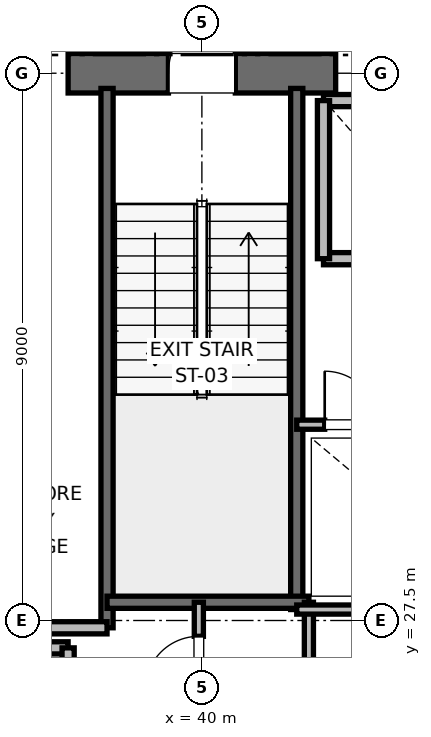
"""IFC4 building model, lengths in metres.
Left out: names, types, materials, properties, quantities, classifications, styles, units other than length and angle.
Written with IfcOpenShell. Run it as: python <this file> out.ifc"""

import sys

from ifc_helpers import new_model, si_unit, direction, frame, frame_2d, origin, place, context, subcontext, project, spatial, rectangle, extrude, element, fill, save


model = new_model("IFC4")
c1 = context("Model", 3, precision=1e-05, world=origin(), true_north=direction((0.0, 1.0)))
c2 = subcontext(c1, "Body", "Model", "MODEL_VIEW")
j1 = project(units=[si_unit("LENGTHUNIT", "METRE"), si_unit("PLANEANGLEUNIT", "RADIAN")], contexts=[c1])
p1 = place(None, origin())
s1 = spatial("IfcSite", under=j1, at=p1, CompositionType="ELEMENT")
p2 = place(p1, origin())
s2 = spatial("IfcBuilding", under=s1, at=p2, CompositionType="ELEMENT")
p3 = place(p2, frame((0.0, 0.0, 71.6)))
s3 = spatial("IfcBuildingStorey", under=s2, at=p3, CompositionType="ELEMENT", Elevation=71.6)
p4 = place(p3, frame((37.8, 36.5, 0.0), z_axis=(0.0, 0.0, 1.0), x_axis=(1.0, 0.0, 0.0)))
e1 = element("IfcWall", 1, at=p4, inside=s3, PredefinedType="SHEAR", context=c2, shape_type="SweptSolid", body=[
    extrude(rectangle(XDim=4.4, YDim=0.65, at=frame_2d((2.2, 0.0))), origin(), (0.0, 0.0, 1.0), 3.76),
])
p5 = place(p4, frame((1.65, 0.0, 0.0)))
e2 = element("IfcOpeningElement", 2, at=p5, cuts=e1, PredefinedType="OPENING", context=c2, shape_type="SweptSolid", body=[
    extrude(rectangle(XDim=1.1, YDim=2.15, at=frame_2d((0.55, 1.075))), frame((0.0, 0.325, 0.0), z_axis=(0.0, -1.0, 0.0), x_axis=(1.0, 0.0, 0.0)), (0.0, 0.0, 1.0), 0.65),
])
p6 = place(p3, frame((38.44, 27.38, 0.0), z_axis=(0.0, 0.0, 1.0), x_axis=(0.0, 1.0, 0.0)))
e3 = element("IfcWall", 3, at=p6, inside=s3, PredefinedType="SOLIDWALL", context=c2, shape_type="SweptSolid", body=[
    extrude(rectangle(XDim=8.87, YDim=0.2, at=frame_2d((4.435, 0.0))), origin(), (0.0, 0.0, 1.0), 3.76),
])
p7 = place(p3, frame((41.56, 27.68, 0.0), z_axis=(0.0, 0.0, 1.0), x_axis=(0.0, 1.0, 0.0)))
e4 = element("IfcWall", 4, at=p7, inside=s3, PredefinedType="SOLIDWALL", context=c2, shape_type="SweptSolid", body=[
    extrude(rectangle(XDim=8.57, YDim=0.2, at=frame_2d((4.285, 0.0))), origin(), (0.0, 0.0, 1.0), 3.76),
])
p8 = place(p3, frame((38.44, 27.8, 0.0), z_axis=(0.0, 0.0, 1.0), x_axis=(1.0, 0.0, 0.0)))
e5 = element("IfcWall", 5, at=p8, inside=s3, PredefinedType="SOLIDWALL", context=c2, shape_type="SweptSolid", body=[
    extrude(rectangle(XDim=3.32, YDim=0.2, at=frame_2d((1.66, 0.0))), origin(), (0.0, 0.0, 1.0), 3.76),
])
p9 = place(p3, frame((32.82, 27.38, 0.0), z_axis=(0.0, 0.0, 1.0), x_axis=(1.0, 0.0, 0.0)))
e6 = element("IfcWall", 6, at=p9, inside=s3, PredefinedType="PARTITIONING", context=c2, shape_type="SweptSolid", body=[
    extrude(rectangle(XDim=5.62, YDim=0.2, at=frame_2d((2.81, 0.0))), origin(), (0.0, 0.0, 1.0), 3.76),
])
p10 = place(p3, frame((37.8, 27.05, 0.0), z_axis=(0.0, 0.0, 1.0), x_axis=(-1.0, 0.0, 0.0)))
e7 = element("IfcWall", 7, at=p10, inside=s3, PredefinedType="SOLIDWALL", context=c2, shape_type="SweptSolid", body=[
    extrude(rectangle(XDim=2.3, YDim=0.2, at=frame_2d((1.15, 0.0))), origin(), (0.0, 0.0, 1.0), 3.76),
])
p11 = place(p3, frame((37.8, 24.45, 0.0), z_axis=(0.0, 0.0, 1.0), x_axis=(0.0, 1.0, 0.0)))
e8 = element("IfcWall", 8, at=p11, inside=s3, PredefinedType="SOLIDWALL", context=c2, shape_type="SweptSolid", body=[
    extrude(rectangle(XDim=2.6, YDim=0.2, at=frame_2d((1.3, 0.0))), origin(), (0.0, 0.0, 1.0), 3.76),
])
p12 = place(p3, frame((42.0, 33.45, 0.0), z_axis=(0.0, 0.0, 1.0), x_axis=(1.0, 0.0, 0.0)))
e9 = element("IfcWall", 9, at=p12, inside=s3, PredefinedType="SOLIDWALL", context=c2, shape_type="SweptSolid", body=[
    extrude(rectangle(XDim=2.3, YDim=0.2, at=frame_2d((1.15, 0.0))), origin(), (0.0, 0.0, 1.0), 3.76),
])
p13 = place(p3, frame((44.3, 36.05, 0.0), z_axis=(0.0, 0.0, 1.0), x_axis=(-1.0, 0.0, 0.0)))
e10 = element("IfcWall", 10, at=p13, inside=s3, PredefinedType="SOLIDWALL", context=c2, shape_type="SweptSolid", body=[
    extrude(rectangle(XDim=2.3, YDim=0.2, at=frame_2d((1.15, 0.0))), origin(), (0.0, 0.0, 1.0), 2.54),
])
p14 = place(p3, frame((42.0, 36.05, 0.0), z_axis=(0.0, 0.0, 1.0), x_axis=(0.0, -1.0, 0.0)))
e11 = element("IfcWall", 11, at=p14, inside=s3, PredefinedType="SOLIDWALL", context=c2, shape_type="SweptSolid", body=[
    extrude(rectangle(XDim=2.6, YDim=0.2, at=frame_2d((1.3, 0.0))), origin(), (0.0, 0.0, 1.0), 2.54),
])
p15 = place(p3, frame((41.76, 23.8, 0.0), z_axis=(0.0, 0.0, 1.0), x_axis=(0.0, 1.0, 0.0)))
e12 = element("IfcWall", 12, at=p15, inside=s3, PredefinedType="PARTITIONING", context=c2, shape_type="SweptSolid", body=[
    extrude(rectangle(XDim=4.0, YDim=0.15, at=frame_2d((2.0, 0.0))), origin(), (0.0, 0.0, 1.0), 2.85),
])
p16 = place(p3, frame((39.95, 25.8, 0.0), z_axis=(0.0, 0.0, 1.0), x_axis=(0.0, 1.0, 0.0)))
e13 = element("IfcWall", 13, at=p16, inside=s3, PredefinedType="PARTITIONING", context=c2, shape_type="SweptSolid", body=[
    extrude(rectangle(XDim=2.0, YDim=0.15, at=frame_2d((1.0, 0.0))), origin(), (0.0, 0.0, 1.0), 2.85),
])
p17 = place(p16, frame((0.56, 0.0, 0.0)))
e14 = element("IfcOpeningElement", 14, at=p17, cuts=e13, PredefinedType="OPENING", context=c2, shape_type="SweptSolid", body=[
    extrude(rectangle(XDim=0.88, YDim=2.1, at=frame_2d((0.44, 1.05))), frame((0.0, 0.075, 0.0), z_axis=(0.0, -1.0, 0.0), x_axis=(1.0, 0.0, 0.0)), (0.0, 0.0, 1.0), 0.15),
])
p18 = place(p3, frame((41.56, 27.68, 0.0), z_axis=(0.0, 0.0, 1.0), x_axis=(1.0, 0.0, 0.0)))
e15 = element("IfcWall", 15, at=p18, inside=s3, PredefinedType="PARTITIONING", context=c2, shape_type="SweptSolid", body=[
    extrude(rectangle(XDim=3.59, YDim=0.15, at=frame_2d((1.795, 0.0))), origin(), (0.0, 0.0, 1.0), 2.85),
])
p19 = place(p3, frame((41.56, 30.72, 0.0), z_axis=(0.0, 0.0, 1.0), x_axis=(1.0, 0.0, 0.0)))
e16 = element("IfcWall", 16, at=p19, inside=s3, PredefinedType="PARTITIONING", context=c2, shape_type="SweptSolid", body=[
    extrude(rectangle(XDim=1.8, YDim=0.15, at=frame_2d((0.9, 0.0))), origin(), (0.0, 0.0, 1.0), 2.85),
])
p20 = place(p19, frame((0.46, 0.0, 0.0)))
e17 = element("IfcOpeningElement", 17, at=p20, cuts=e16, PredefinedType="OPENING", context=c2, shape_type="SweptSolid", body=[
    extrude(rectangle(XDim=0.88, YDim=2.1, at=frame_2d((0.44, 1.05))), frame((0.0, 0.075, 0.0), z_axis=(0.0, -1.0, 0.0), x_axis=(1.0, 0.0, 0.0)), (0.0, 0.0, 1.0), 0.15),
])
p21 = place(p5, origin())
e18 = element("IfcDoor", 18, at=p21, inside=s3, OperationType="SINGLE_SWING_RIGHT", PredefinedType="DOOR", context=c2, shape_type="SweptSolid", body=[
    extrude(rectangle(XDim=1.1, YDim=2.15, at=frame_2d((0.55, 1.075))), frame((0.0, 0.025, 0.0), z_axis=(0.0, -1.0, 0.0), x_axis=(1.0, 0.0, 0.0)), (0.0, 0.0, 1.0), 0.05),
])
fill(e2, e18)
p22 = place(p17, origin())
e19 = element("IfcDoor", 19, at=p22, inside=s3, OperationType="SINGLE_SWING_LEFT", PredefinedType="DOOR", context=c2, shape_type="SweptSolid", body=[
    extrude(rectangle(XDim=0.88, YDim=2.1, at=frame_2d((0.44, 1.05))), frame((0.0, 0.025, 0.0), z_axis=(0.0, -1.0, 0.0), x_axis=(1.0, 0.0, 0.0)), (0.0, 0.0, 1.0), 0.05),
])
fill(e14, e19)
p23 = place(p20, origin())
e20 = element("IfcDoor", 20, at=p23, inside=s3, OperationType="SINGLE_SWING_LEFT", PredefinedType="DOOR", context=c2, shape_type="SweptSolid", body=[
    extrude(rectangle(XDim=0.88, YDim=2.1, at=frame_2d((0.44, 1.05))), frame((0.0, 0.025, 0.0), z_axis=(0.0, -1.0, 0.0), x_axis=(1.0, 0.0, 0.0)), (0.0, 0.0, 1.0), 0.05),
])
fill(e17, e20)
save(model, sys.argv[1])
